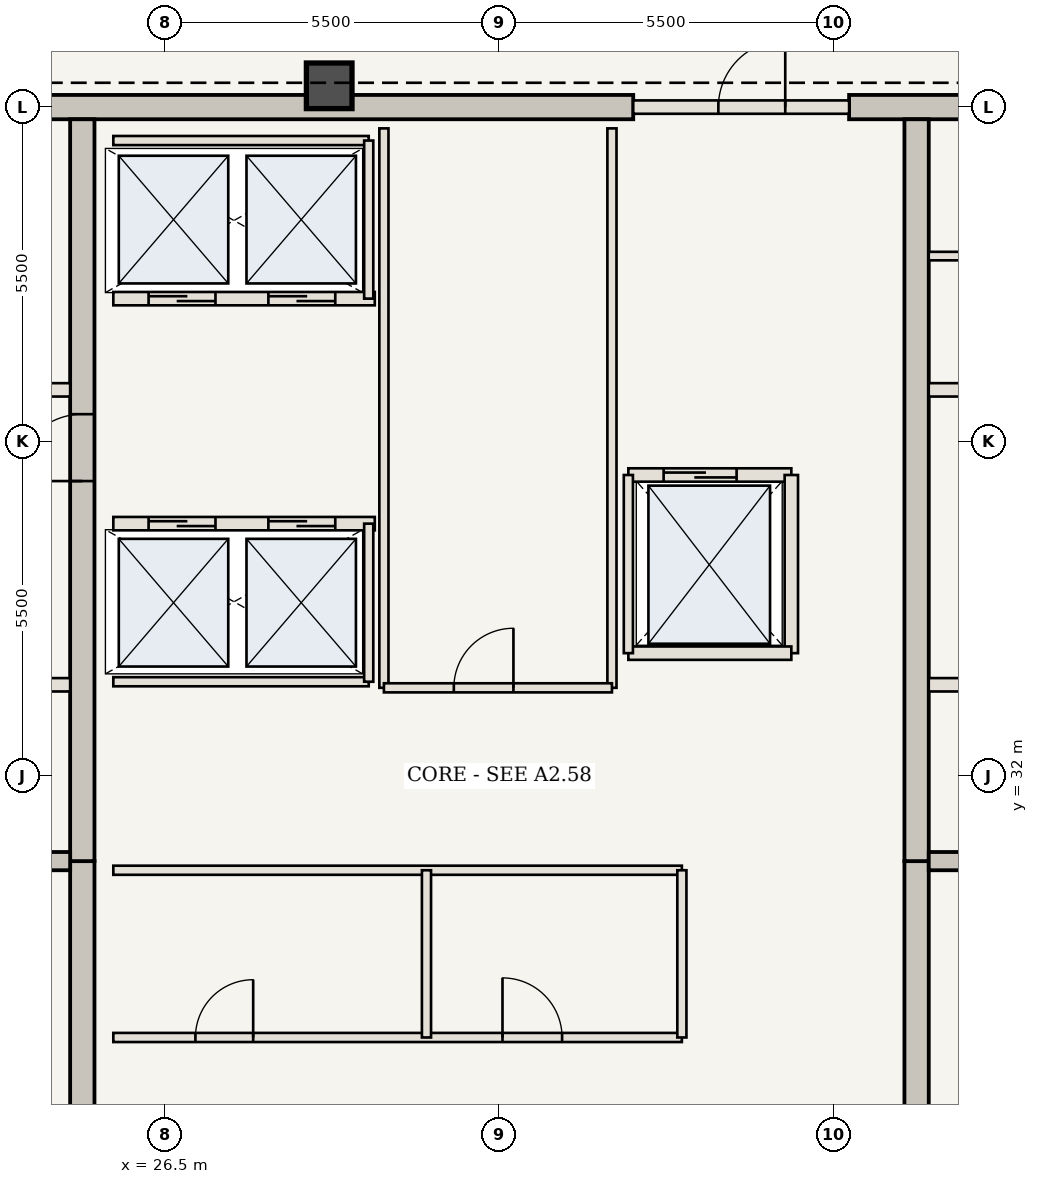
"""IFC4 building model, lengths in metres.
Left out: names, types, materials, properties, quantities, classifications, styles, units other than length and angle.
Written with IfcOpenShell. Run it as: python <this file> out.ifc"""

import sys

from ifc_helpers import new_model, si_unit, direction, frame, frame_2d, origin, origin_2d, place, context, subcontext, project, spatial, rectangle, extrude, element, fill, save


model = new_model("IFC4")
c1 = context("Model", 3, precision=1e-05, world=origin(), true_north=direction((0.0, 1.0)))
c2 = subcontext(c1, "Body", "Model", "MODEL_VIEW")
j1 = project(units=[si_unit("LENGTHUNIT", "METRE"), si_unit("PLANEANGLEUNIT", "RADIAN")], contexts=[c1])
p1 = place(None, origin())
s1 = spatial("IfcSite", under=j1, at=p1, CompositionType="ELEMENT")
p2 = place(p1, origin())
s2 = spatial("IfcBuilding", under=s1, at=p2, CompositionType="ELEMENT")
p3 = place(p2, frame((0.0, 0.0, 266.0)))
s3 = spatial("IfcBuildingStorey", under=s2, at=p3, CompositionType="ELEMENT", Elevation=266.0)
p4 = place(p3, frame((21.41, 43.0, 0.0), z_axis=(0.0, 0.0, 1.0), x_axis=(1.0, 0.0, 0.0)))
e1 = element("IfcWall", 1, at=p4, inside=s3, PredefinedType="SHEAR", context=c2, shape_type="SweptSolid", body=[
    extrude(rectangle(XDim=12.79, YDim=0.4, at=frame_2d((6.395, 0.0))), origin(), (0.0, 0.0, 1.0), 3.85),
])
p5 = place(p3, frame((37.75, 43.0, 0.0), z_axis=(0.0, 0.0, 1.0), x_axis=(1.0, 0.0, 0.0)))
e2 = element("IfcWall", 2, at=p5, inside=s3, PredefinedType="SHEAR", context=c2, shape_type="SweptSolid", body=[
    extrude(rectangle(XDim=4.84, YDim=0.4, at=frame_2d((2.42, 0.0))), origin(), (0.0, 0.0, 1.0), 3.85),
])
p6 = place(p3, frame((25.14, 21.15, 0.0), z_axis=(0.0, 0.0, 1.0), x_axis=(0.0, 1.0, 0.0)))
e3 = element("IfcWall", 3, at=p6, inside=s3, PredefinedType="SHEAR", context=c2, shape_type="SweptSolid", body=[
    extrude(rectangle(XDim=9.45, YDim=0.4, at=frame_2d((4.725, 0.0))), origin(), (0.0, 0.0, 1.0), 3.85),
])
p7 = place(p3, frame((25.14, 30.6, 0.0), z_axis=(0.0, 0.0, 1.0), x_axis=(0.0, 1.0, 0.0)))
e4 = element("IfcWall", 4, at=p7, inside=s3, PredefinedType="SHEAR", context=c2, shape_type="SweptSolid", body=[
    extrude(rectangle(XDim=12.2, YDim=0.4, at=frame_2d((6.1, 0.0))), origin(), (0.0, 0.0, 1.0), 3.85),
])
p8 = place(p7, frame((6.25, 0.0, 0.0)))
e5 = element("IfcOpeningElement", 5, at=p8, cuts=e4, PredefinedType="OPENING", context=c2, shape_type="SweptSolid", body=[
    extrude(rectangle(XDim=1.1, YDim=2.15, at=frame_2d((0.55, 1.075))), frame((0.0, 0.21, 0.0), z_axis=(0.0, -1.0, 0.0), x_axis=(1.0, 0.0, 0.0)), (0.0, 0.0, 1.0), 0.42),
])
p9 = place(p3, frame((38.86, 21.15, 0.0), z_axis=(0.0, 0.0, 1.0), x_axis=(0.0, 1.0, 0.0)))
e6 = element("IfcWall", 6, at=p9, inside=s3, PredefinedType="SHEAR", context=c2, shape_type="SweptSolid", body=[
    extrude(rectangle(XDim=9.45, YDim=0.4, at=frame_2d((4.725, 0.0))), origin(), (0.0, 0.0, 1.0), 3.85),
])
p10 = place(p3, frame((38.86, 30.6, 0.0), z_axis=(0.0, 0.0, 1.0), x_axis=(0.0, 1.0, 0.0)))
e7 = element("IfcWall", 7, at=p10, inside=s3, PredefinedType="SHEAR", context=c2, shape_type="SweptSolid", body=[
    extrude(rectangle(XDim=12.2, YDim=0.4, at=frame_2d((6.1, 0.0))), origin(), (0.0, 0.0, 1.0), 3.85),
])
p11 = place(p3, frame((29.2, 43.35, 0.0), z_axis=(0.0, 0.0, 1.0), x_axis=(1.0, 0.0, 0.0)))
e8 = element("IfcColumn", 8, at=p11, inside=s3, PredefinedType="COLUMN", context=c2, shape_type="SweptSolid", body=[
    extrude(rectangle(XDim=0.75, YDim=0.75, at=origin_2d()), origin(), (0.0, 0.0, 1.0), 3.85),
])
for number, where, z_axis, x_axis in (
    (9, (21.41, 30.6, 0.0), (0.0, 0.0, 1.0), (1.0, 0.0, 0.0)),
    (10, (39.06, 30.6, 0.0), (0.0, 0.0, 1.0), (1.0, 0.0, 0.0)),
):
    element("IfcWall", number, at=place(p3, frame(where, z_axis=z_axis, x_axis=x_axis)), inside=s3, PredefinedType="SHEAR", context=c2, shape_type="SweptSolid", body=[
        extrude(rectangle(XDim=3.53, YDim=0.3, at=frame_2d((1.765, 0.0))), origin(), (0.0, 0.0, 1.0), 3.685),
    ])
p12 = place(p3, frame((21.41, 33.5, 0.0), z_axis=(0.0, 0.0, 1.0), x_axis=(1.0, 0.0, 0.0)))
e11 = element("IfcWall", 11, at=p12, inside=s3, PredefinedType="STANDARD", context=c2, shape_type="SweptSolid", body=[
    extrude(rectangle(XDim=3.53, YDim=0.22, at=frame_2d((1.765, 0.0))), origin(), (0.0, 0.0, 1.0), 3.685),
])
p13 = place(p12, frame((0.75, 0.0, 0.0)))
e12 = element("IfcOpeningElement", 12, at=p13, cuts=e11, PredefinedType="OPENING", context=c2, shape_type="SweptSolid", body=[
    extrude(rectangle(XDim=1.2, YDim=2.2, at=frame_2d((0.6, 1.1))), frame((0.0, 0.12, 0.0), z_axis=(0.0, -1.0, 0.0), x_axis=(1.0, 0.0, 0.0)), (0.0, 0.0, 1.0), 0.24),
])
p14 = place(p3, frame((39.06, 33.5, 0.0), z_axis=(0.0, 0.0, 1.0), x_axis=(1.0, 0.0, 0.0)))
e13 = element("IfcWall", 13, at=p14, inside=s3, PredefinedType="STANDARD", context=c2, shape_type="SweptSolid", body=[
    extrude(rectangle(XDim=3.53, YDim=0.22, at=frame_2d((1.765, 0.0))), origin(), (0.0, 0.0, 1.0), 3.685),
])
p15 = place(p14, frame((1.55, 0.0, 0.0)))
e14 = element("IfcOpeningElement", 14, at=p15, cuts=e13, PredefinedType="OPENING", context=c2, shape_type="SweptSolid", body=[
    extrude(rectangle(XDim=1.2, YDim=2.2, at=frame_2d((0.6, 1.1))), frame((0.0, 0.12, 0.0), z_axis=(0.0, -1.0, 0.0), x_axis=(1.0, 0.0, 0.0)), (0.0, 0.0, 1.0), 0.24),
])
for number, where, z_axis, x_axis in (
    (15, (21.41, 38.35, 0.0), (0.0, 0.0, 1.0), (1.0, 0.0, 0.0)),
    (16, (39.06, 38.35, 0.0), (0.0, 0.0, 1.0), (1.0, 0.0, 0.0)),
):
    element("IfcWall", number, at=place(p3, frame(where, z_axis=z_axis, x_axis=x_axis)), inside=s3, PredefinedType="STANDARD", context=c2, shape_type="SweptSolid", body=[
        extrude(rectangle(XDim=3.53, YDim=0.22, at=frame_2d((1.765, 0.0))), origin(), (0.0, 0.0, 1.0), 3.685),
    ])
p16 = place(p3, frame((39.06, 40.55, 0.0), z_axis=(0.0, 0.0, 1.0), x_axis=(1.0, 0.0, 0.0)))
e17 = element("IfcWall", 17, at=p16, inside=s3, PredefinedType="STANDARD", context=c2, shape_type="SweptSolid", body=[
    extrude(rectangle(XDim=3.53, YDim=0.14, at=frame_2d((1.765, 0.0))), origin(), (0.0, 0.0, 1.0), 3.685),
])
p17 = place(p3, frame((25.65, 27.7, 0.0), z_axis=(0.0, 0.0, 1.0), x_axis=(1.0, 0.0, 0.0)))
e18 = element("IfcWall", 18, at=p17, inside=s3, PredefinedType="STANDARD", context=c2, shape_type="SweptSolid", body=[
    extrude(rectangle(XDim=9.35, YDim=0.15, at=frame_2d((4.675, 0.0))), origin(), (0.0, 0.0, 1.0), 3.685),
])
p18 = place(p17, frame((1.35, 0.0, 0.0)))
e19 = element("IfcOpeningElement", 19, at=p18, cuts=e18, PredefinedType="OPENING", context=c2, shape_type="SweptSolid", body=[
    extrude(rectangle(XDim=0.95, YDim=2.15, at=frame_2d((0.475, 1.075))), frame((0.0, 0.085, 0.0), z_axis=(0.0, -1.0, 0.0), x_axis=(1.0, 0.0, 0.0)), (0.0, 0.0, 1.0), 0.17),
])
p19 = place(p17, frame((6.4, 0.0, 0.0)))
e20 = element("IfcOpeningElement", 20, at=p19, cuts=e18, PredefinedType="OPENING", context=c2, shape_type="SweptSolid", body=[
    extrude(rectangle(XDim=0.98, YDim=2.2, at=frame_2d((0.49, 1.1))), frame((0.0, 0.085, 0.0), z_axis=(0.0, -1.0, 0.0), x_axis=(1.0, 0.0, 0.0)), (0.0, 0.0, 1.0), 0.17),
])
p20 = place(p3, frame((25.65, 30.45, 0.0), z_axis=(0.0, 0.0, 1.0), x_axis=(1.0, 0.0, 0.0)))
e21 = element("IfcWall", 21, at=p20, inside=s3, PredefinedType="STANDARD", context=c2, shape_type="SweptSolid", body=[
    extrude(rectangle(XDim=9.35, YDim=0.15, at=frame_2d((4.675, 0.0))), origin(), (0.0, 0.0, 1.0), 3.685),
])
for number, where, z_axis, x_axis in (
    (22, (30.8, 27.7, 0.0), (0.0, 0.0, 1.0), (0.0, 1.0, 0.0)),
    (23, (35.0, 27.7, 0.0), (0.0, 0.0, 1.0), (0.0, 1.0, 0.0)),
):
    element("IfcWall", number, at=place(p3, frame(where, z_axis=z_axis, x_axis=x_axis)), inside=s3, PredefinedType="STANDARD", context=c2, shape_type="SweptSolid", body=[
        extrude(rectangle(XDim=2.75, YDim=0.15, at=frame_2d((1.375, 0.0))), origin(), (0.0, 0.0, 1.0), 3.685),
    ])
p21 = place(p3, frame((25.65, 36.15, 0.0), z_axis=(0.0, 0.0, 1.0), x_axis=(1.0, 0.0, 0.0)))
e24 = element("IfcWall", 24, at=p21, inside=s3, PredefinedType="STANDARD", context=c2, shape_type="SweptSolid", body=[
    extrude(rectangle(XDim=4.3, YDim=0.22, at=frame_2d((2.15, 0.0))), origin(), (0.0, 0.0, 1.0), 3.685),
])
p22 = place(p21, frame((0.58, 0.0, 0.0)))
e25 = element("IfcOpeningElement", 25, at=p22, cuts=e24, PredefinedType="OPENING", context=c2, shape_type="SweptSolid", body=[
    extrude(rectangle(XDim=1.1, YDim=2.15, at=frame_2d((0.55, 1.075))), frame((0.0, 0.12, 0.0), z_axis=(0.0, -1.0, 0.0), x_axis=(1.0, 0.0, 0.0)), (0.0, 0.0, 1.0), 0.24),
])
p23 = place(p21, frame((2.55, 0.0, 0.0)))
e26 = element("IfcOpeningElement", 26, at=p23, cuts=e24, PredefinedType="OPENING", context=c2, shape_type="SweptSolid", body=[
    extrude(rectangle(XDim=1.1, YDim=2.15, at=frame_2d((0.55, 1.075))), frame((0.0, 0.12, 0.0), z_axis=(0.0, -1.0, 0.0), x_axis=(1.0, 0.0, 0.0)), (0.0, 0.0, 1.0), 0.24),
])
p24 = place(p3, frame((25.65, 33.55, 0.0), z_axis=(0.0, 0.0, 1.0), x_axis=(1.0, 0.0, 0.0)))
e27 = element("IfcWall", 27, at=p24, inside=s3, PredefinedType="STANDARD", context=c2, shape_type="SweptSolid", body=[
    extrude(rectangle(XDim=4.2, YDim=0.15, at=frame_2d((2.1, 0.0))), origin(), (0.0, 0.0, 1.0), 3.685),
])
p25 = place(p3, frame((29.85, 33.55, 0.0), z_axis=(0.0, 0.0, 1.0), x_axis=(0.0, 1.0, 0.0)))
e28 = element("IfcWall", 28, at=p25, inside=s3, PredefinedType="STANDARD", context=c2, shape_type="SweptSolid", body=[
    extrude(rectangle(XDim=2.6, YDim=0.15, at=frame_2d((1.3, 0.0))), origin(), (0.0, 0.0, 1.0), 3.685),
])
p26 = place(p3, frame((25.65, 39.85, 0.0), z_axis=(0.0, 0.0, 1.0), x_axis=(1.0, 0.0, 0.0)))
e29 = element("IfcWall", 29, at=p26, inside=s3, PredefinedType="STANDARD", context=c2, shape_type="SweptSolid", body=[
    extrude(rectangle(XDim=4.3, YDim=0.22, at=frame_2d((2.15, 0.0))), origin(), (0.0, 0.0, 1.0), 3.685),
])
p27 = place(p26, frame((0.58, 0.0, 0.0)))
e30 = element("IfcOpeningElement", 30, at=p27, cuts=e29, PredefinedType="OPENING", context=c2, shape_type="SweptSolid", body=[
    extrude(rectangle(XDim=1.1, YDim=2.15, at=frame_2d((0.55, 1.075))), frame((0.0, 0.12, 0.0), z_axis=(0.0, -1.0, 0.0), x_axis=(1.0, 0.0, 0.0)), (0.0, 0.0, 1.0), 0.24),
])
p28 = place(p26, frame((2.55, 0.0, 0.0)))
e31 = element("IfcOpeningElement", 31, at=p28, cuts=e29, PredefinedType="OPENING", context=c2, shape_type="SweptSolid", body=[
    extrude(rectangle(XDim=1.1, YDim=2.15, at=frame_2d((0.55, 1.075))), frame((0.0, 0.12, 0.0), z_axis=(0.0, -1.0, 0.0), x_axis=(1.0, 0.0, 0.0)), (0.0, 0.0, 1.0), 0.24),
])
p29 = place(p3, frame((25.65, 42.45, 0.0), z_axis=(0.0, 0.0, 1.0), x_axis=(1.0, 0.0, 0.0)))
e32 = element("IfcWall", 32, at=p29, inside=s3, PredefinedType="STANDARD", context=c2, shape_type="SweptSolid", body=[
    extrude(rectangle(XDim=4.2, YDim=0.15, at=frame_2d((2.1, 0.0))), origin(), (0.0, 0.0, 1.0), 3.685),
])
p30 = place(p3, frame((29.85, 39.85, 0.0), z_axis=(0.0, 0.0, 1.0), x_axis=(0.0, 1.0, 0.0)))
e33 = element("IfcWall", 33, at=p30, inside=s3, PredefinedType="STANDARD", context=c2, shape_type="SweptSolid", body=[
    extrude(rectangle(XDim=2.6, YDim=0.15, at=frame_2d((1.3, 0.0))), origin(), (0.0, 0.0, 1.0), 3.685),
])
for number, where, z_axis, x_axis in (
    (34, (30.1, 33.45, 0.0), (0.0, 0.0, 1.0), (0.0, 1.0, 0.0)),
    (35, (33.85, 33.45, 0.0), (0.0, 0.0, 1.0), (0.0, 1.0, 0.0)),
):
    element("IfcWall", number, at=place(p3, frame(where, z_axis=z_axis, x_axis=x_axis)), inside=s3, PredefinedType="STANDARD", context=c2, shape_type="SweptSolid", body=[
        extrude(rectangle(XDim=9.2, YDim=0.15, at=frame_2d((4.6, 0.0))), origin(), (0.0, 0.0, 1.0), 3.685),
    ])
p31 = place(p3, frame((30.1, 33.45, 0.0), z_axis=(0.0, 0.0, 1.0), x_axis=(1.0, 0.0, 0.0)))
e36 = element("IfcWall", 36, at=p31, inside=s3, PredefinedType="STANDARD", context=c2, shape_type="SweptSolid", body=[
    extrude(rectangle(XDim=3.75, YDim=0.15, at=frame_2d((1.875, 0.0))), origin(), (0.0, 0.0, 1.0), 3.685),
])
p32 = place(p31, frame((1.15, 0.0, 0.0)))
e37 = element("IfcOpeningElement", 37, at=p32, cuts=e36, PredefinedType="OPENING", context=c2, shape_type="SweptSolid", body=[
    extrude(rectangle(XDim=0.98, YDim=2.2, at=frame_2d((0.49, 1.1))), frame((0.0, 0.085, 0.0), z_axis=(0.0, -1.0, 0.0), x_axis=(1.0, 0.0, 0.0)), (0.0, 0.0, 1.0), 0.17),
])
p33 = place(p3, frame((34.2, 43.0, 0.0), z_axis=(0.0, 0.0, 1.0), x_axis=(1.0, 0.0, 0.0)))
e38 = element("IfcWall", 38, at=p33, inside=s3, PredefinedType="STANDARD", context=c2, shape_type="SweptSolid", body=[
    extrude(rectangle(XDim=3.55, YDim=0.22, at=frame_2d((1.775, 0.0))), origin(), (0.0, 0.0, 1.0), 3.685),
])
p34 = place(p33, frame((1.4, 0.0, 0.0)))
e39 = element("IfcOpeningElement", 39, at=p34, cuts=e38, PredefinedType="OPENING", context=c2, shape_type="SweptSolid", body=[
    extrude(rectangle(XDim=1.1, YDim=2.15, at=frame_2d((0.55, 1.075))), frame((0.0, 0.12, 0.0), z_axis=(0.0, -1.0, 0.0), x_axis=(1.0, 0.0, 0.0)), (0.0, 0.0, 1.0), 0.24),
])
p35 = place(p3, frame((34.12, 36.95, 0.0), z_axis=(0.0, 0.0, 1.0), x_axis=(1.0, 0.0, 0.0)))
e40 = element("IfcWall", 40, at=p35, inside=s3, PredefinedType="STANDARD", context=c2, shape_type="SweptSolid", body=[
    extrude(rectangle(XDim=2.68, YDim=0.22, at=frame_2d((1.34, 0.0))), origin(), (0.0, 0.0, 1.0), 3.685),
])
p36 = place(p35, frame((0.58, 0.0, 0.0)))
e41 = element("IfcOpeningElement", 41, at=p36, cuts=e40, PredefinedType="OPENING", context=c2, shape_type="SweptSolid", body=[
    extrude(rectangle(XDim=1.2, YDim=2.2, at=frame_2d((0.6, 1.1))), frame((0.0, 0.12, 0.0), z_axis=(0.0, -1.0, 0.0), x_axis=(1.0, 0.0, 0.0)), (0.0, 0.0, 1.0), 0.24),
])
p37 = place(p3, frame((36.8, 34.02, 0.0), z_axis=(0.0, 0.0, 1.0), x_axis=(0.0, 1.0, 0.0)))
e42 = element("IfcWall", 42, at=p37, inside=s3, PredefinedType="STANDARD", context=c2, shape_type="SweptSolid", body=[
    extrude(rectangle(XDim=2.93, YDim=0.22, at=frame_2d((1.465, 0.0))), origin(), (0.0, 0.0, 1.0), 3.685),
])
p38 = place(p3, frame((34.12, 34.02, 0.0), z_axis=(0.0, 0.0, 1.0), x_axis=(1.0, 0.0, 0.0)))
e43 = element("IfcWall", 43, at=p38, inside=s3, PredefinedType="STANDARD", context=c2, shape_type="SweptSolid", body=[
    extrude(rectangle(XDim=2.68, YDim=0.22, at=frame_2d((1.34, 0.0))), origin(), (0.0, 0.0, 1.0), 3.685),
])
p39 = place(p3, frame((34.12, 34.02, 0.0), z_axis=(0.0, 0.0, 1.0), x_axis=(0.0, 1.0, 0.0)))
e44 = element("IfcWall", 44, at=p39, inside=s3, PredefinedType="STANDARD", context=c2, shape_type="SweptSolid", body=[
    extrude(rectangle(XDim=2.93, YDim=0.15, at=frame_2d((1.465, 0.0))), origin(), (0.0, 0.0, 1.0), 3.685),
])
p40 = place(p8, origin())
e45 = element("IfcDoor", 45, at=p40, inside=s3, OperationType="SINGLE_SWING_LEFT", PredefinedType="DOOR", context=c2, shape_type="SweptSolid", body=[
    extrude(rectangle(XDim=1.1, YDim=2.15, at=frame_2d((0.55, 1.075))), frame((0.0, 0.025, 0.0), z_axis=(0.0, -1.0, 0.0), x_axis=(1.0, 0.0, 0.0)), (0.0, 0.0, 1.0), 0.05),
])
fill(e5, e45)
p41 = place(p18, origin())
e46 = element("IfcDoor", 46, at=p41, inside=s3, OperationType="SINGLE_SWING_RIGHT", PredefinedType="DOOR", context=c2, shape_type="SweptSolid", body=[
    extrude(rectangle(XDim=0.95, YDim=2.15, at=frame_2d((0.475, 1.075))), frame((0.0, 0.025, 0.0), z_axis=(0.0, -1.0, 0.0), x_axis=(1.0, 0.0, 0.0)), (0.0, 0.0, 1.0), 0.05),
])
fill(e19, e46)
p42 = place(p19, origin())
e47 = element("IfcDoor", 47, at=p42, inside=s3, OperationType="SINGLE_SWING_LEFT", PredefinedType="DOOR", context=c2, shape_type="SweptSolid", body=[
    extrude(rectangle(XDim=0.98, YDim=2.2, at=frame_2d((0.49, 1.1))), frame((0.0, 0.025, 0.0), z_axis=(0.0, -1.0, 0.0), x_axis=(1.0, 0.0, 0.0)), (0.0, 0.0, 1.0), 0.05),
])
fill(e20, e47)
p43 = place(p22, origin())
e48 = element("IfcDoor", 48, at=p43, inside=s3, OperationType="DOUBLE_DOOR_SLIDING", PredefinedType="DOOR", context=c2, shape_type="SweptSolid", body=[
    extrude(rectangle(XDim=1.1, YDim=2.15, at=frame_2d((0.55, 1.075))), frame((0.0, 0.025, 0.0), z_axis=(0.0, -1.0, 0.0), x_axis=(1.0, 0.0, 0.0)), (0.0, 0.0, 1.0), 0.05),
])
fill(e25, e48)
p44 = place(p23, origin())
e49 = element("IfcDoor", 49, at=p44, inside=s3, OperationType="DOUBLE_DOOR_SLIDING", PredefinedType="DOOR", context=c2, shape_type="SweptSolid", body=[
    extrude(rectangle(XDim=1.1, YDim=2.15, at=frame_2d((0.55, 1.075))), frame((0.0, 0.025, 0.0), z_axis=(0.0, -1.0, 0.0), x_axis=(1.0, 0.0, 0.0)), (0.0, 0.0, 1.0), 0.05),
])
fill(e26, e49)
p45 = place(p27, origin())
e50 = element("IfcDoor", 50, at=p45, inside=s3, OperationType="DOUBLE_DOOR_SLIDING", PredefinedType="DOOR", context=c2, shape_type="SweptSolid", body=[
    extrude(rectangle(XDim=1.1, YDim=2.15, at=frame_2d((0.55, 1.075))), frame((0.0, 0.025, 0.0), z_axis=(0.0, -1.0, 0.0), x_axis=(1.0, 0.0, 0.0)), (0.0, 0.0, 1.0), 0.05),
])
fill(e30, e50)
p46 = place(p28, origin())
e51 = element("IfcDoor", 51, at=p46, inside=s3, OperationType="DOUBLE_DOOR_SLIDING", PredefinedType="DOOR", context=c2, shape_type="SweptSolid", body=[
    extrude(rectangle(XDim=1.1, YDim=2.15, at=frame_2d((0.55, 1.075))), frame((0.0, 0.025, 0.0), z_axis=(0.0, -1.0, 0.0), x_axis=(1.0, 0.0, 0.0)), (0.0, 0.0, 1.0), 0.05),
])
fill(e31, e51)
p47 = place(p32, origin())
e52 = element("IfcDoor", 52, at=p47, inside=s3, OperationType="SINGLE_SWING_RIGHT", PredefinedType="DOOR", context=c2, shape_type="SweptSolid", body=[
    extrude(rectangle(XDim=0.98, YDim=2.2, at=frame_2d((0.49, 1.1))), frame((0.0, 0.025, 0.0), z_axis=(0.0, -1.0, 0.0), x_axis=(1.0, 0.0, 0.0)), (0.0, 0.0, 1.0), 0.05),
])
fill(e37, e52)
p48 = place(p34, origin())
e53 = element("IfcDoor", 53, at=p48, inside=s3, OperationType="SINGLE_SWING_RIGHT", PredefinedType="DOOR", context=c2, shape_type="SweptSolid", body=[
    extrude(rectangle(XDim=1.1, YDim=2.15, at=frame_2d((0.55, 1.075))), frame((0.0, 0.025, 0.0), z_axis=(0.0, -1.0, 0.0), x_axis=(1.0, 0.0, 0.0)), (0.0, 0.0, 1.0), 0.05),
])
fill(e39, e53)
p49 = place(p36, origin())
e54 = element("IfcDoor", 54, at=p49, inside=s3, OperationType="DOUBLE_DOOR_SLIDING", PredefinedType="DOOR", context=c2, shape_type="SweptSolid", body=[
    extrude(rectangle(XDim=1.2, YDim=2.2, at=frame_2d((0.6, 1.1))), frame((0.0, 0.025, 0.0), z_axis=(0.0, -1.0, 0.0), x_axis=(1.0, 0.0, 0.0)), (0.0, 0.0, 1.0), 0.05),
])
fill(e41, e54)
save(model, sys.argv[1])
